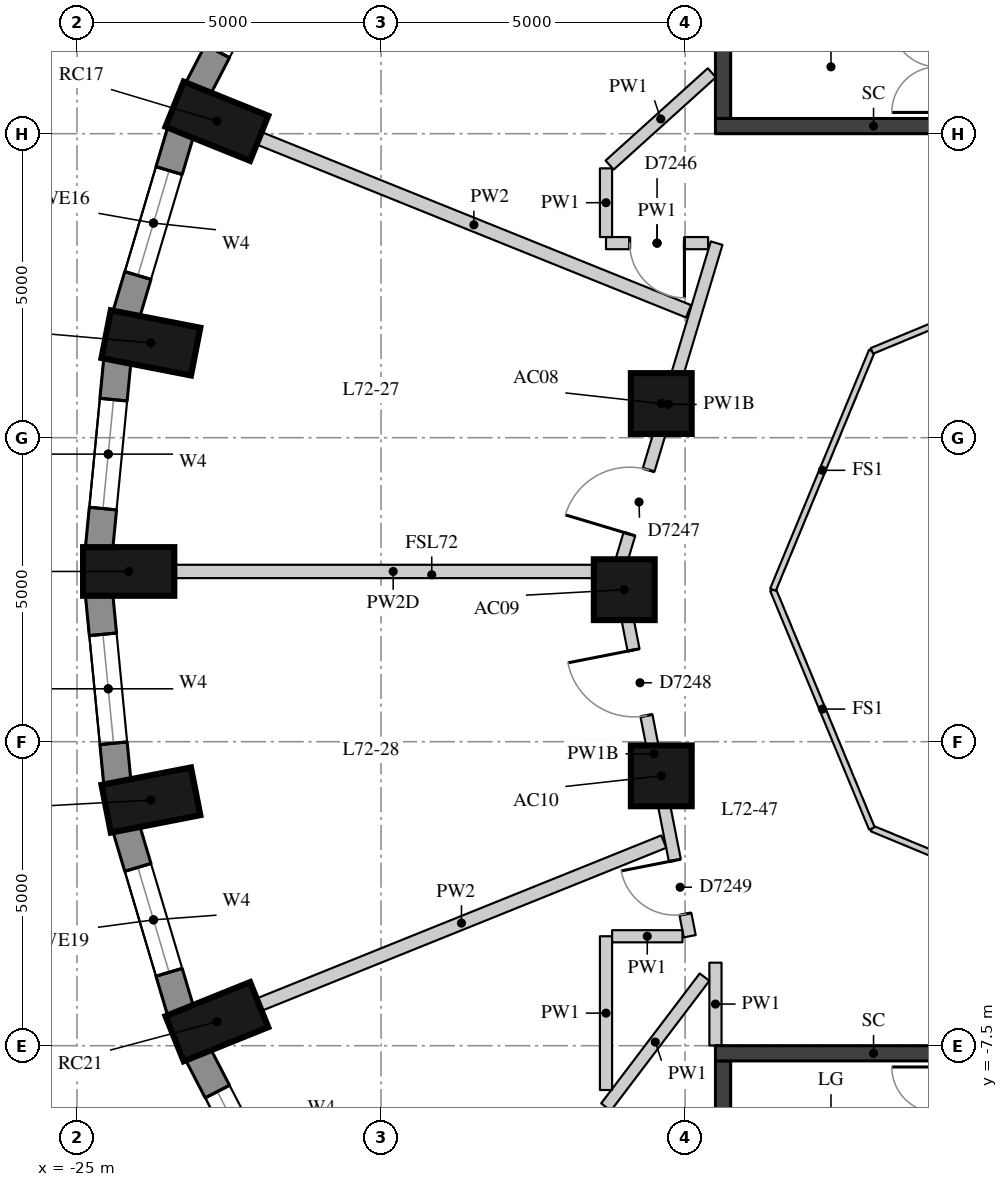
"""IFC4 building model, lengths in metres.
Left out: names, types, materials, properties, quantities, classifications, styles, units other than length and angle.
Written with IfcOpenShell. Run it as: python <this file> out.ifc"""

import sys

from ifc_helpers import new_model, si_unit, direction, frame, frame_2d, origin, origin_2d, place, context, subcontext, project, spatial, rectangle, extrude, element, fill, save


model = new_model("IFC4")
c1 = context("Model", 3, precision=1e-05, world=origin(), true_north=direction((0.0, 1.0)))
c2 = subcontext(c1, "Body", "Model", "MODEL_VIEW")
j1 = project(units=[si_unit("LENGTHUNIT", "METRE"), si_unit("PLANEANGLEUNIT", "RADIAN")], contexts=[c1])
p1 = place(None, origin())
s1 = spatial("IfcSite", under=j1, at=p1, CompositionType="ELEMENT")
p2 = place(p1, origin())
s2 = spatial("IfcBuilding", under=s1, at=p2, CompositionType="ELEMENT")
p3 = place(p2, frame((0.0, 0.0, 253.1)))
s3 = spatial("IfcBuildingStorey", under=s2, at=p3, CompositionType="ELEMENT", Elevation=253.1)
for number, where, z_axis, x_axis in (
    (1, (-22.7, 7.705, 0.0), (0.0, 0.0, 1.0), (-0.928, 0.374, 0.0)),
    (2, (-23.785, 4.06, 0.0), (0.0, 0.0, 1.0), (-0.981, 0.192, 0.0)),
    (3, (-24.15, 0.3, 0.0), (0.0, 0.0, 1.0), (-1.0, 0.0, 0.0)),
    (4, (-23.785, -3.459, 0.0), (0.0, 0.0, 1.0), (-0.981, -0.192, 0.0)),
    (5, (-22.7, -7.105, 0.0), (0.0, 0.0, 1.0), (-0.928, -0.374, 0.0)),
):
    element("IfcColumn", number, at=place(p3, frame(where, z_axis=z_axis, x_axis=x_axis)), inside=s3, PredefinedType="COLUMN", context=c2, shape_type="SweptSolid", body=[
        extrude(rectangle(XDim=1.5, YDim=0.8, at=origin_2d()), origin(), (0.0, 0.0, 1.0), 3.3),
    ])
for number, where, z_axis, x_axis in (
    (6, (-15.391, 3.062, 0.0), (0.0, 0.0, 1.0), (1.0, 0.0, 0.0)),
    (7, (-16.0, 0.0, 0.0), (0.0, 0.0, 1.0), (1.0, 0.0, 0.0)),
    (8, (-15.391, -3.062, 0.0), (0.0, 0.0, 1.0), (1.0, 0.0, 0.0)),
):
    element("IfcColumn", number, at=place(p3, frame(where, z_axis=z_axis, x_axis=x_axis)), inside=s3, PredefinedType="COLUMN", context=c2, shape_type="SweptSolid", body=[
        extrude(rectangle(XDim=1.0, YDim=1.0, at=origin_2d()), origin(), (0.0, 0.0, 1.0), 3.3),
    ])
p4 = place(p3, frame((-21.545, 11.068, 0.0), z_axis=(0.0, 0.0, 1.0), x_axis=(-0.459889857669, -0.887975967475, 0.0)))
e9 = element("IfcWall", 9, at=p4, inside=s3, PredefinedType="SOLIDWALL", context=c2, shape_type="SweptSolid", body=[
    extrude(rectangle(XDim=3.186, YDim=0.45, at=frame_2d((1.593, 0.0))), origin(), (0.0, 0.0, 1.0), 3.02),
])
p5 = place(p4, frame((0.693, 0.0, 0.4)))
e10 = element("IfcOpeningElement", 10, at=p5, cuts=e9, PredefinedType="OPENING", context=c2, shape_type="SweptSolid", body=[
    extrude(rectangle(XDim=1.8, YDim=1.75, at=frame_2d((0.9, 0.875))), frame((0.0, 0.235, 0.0), z_axis=(0.0, -1.0, 0.0), x_axis=(1.0, 0.0, 0.0)), (0.0, 0.0, 1.0), 0.47),
])
p6 = place(p3, frame((-23.294, 7.535, 0.0), z_axis=(0.0, 0.0, 1.0), x_axis=(-0.285263800865, -0.958449040855, 0.0)))
e11 = element("IfcWall", 11, at=p6, inside=s3, PredefinedType="SOLIDWALL", context=c2, shape_type="SweptSolid", body=[
    extrude(rectangle(XDim=3.139, YDim=0.45, at=frame_2d((1.57, 0.0))), origin(), (0.0, 0.0, 1.0), 3.02),
])
p7 = place(p6, frame((0.67, 0.0, 0.4)))
e12 = element("IfcOpeningElement", 12, at=p7, cuts=e11, PredefinedType="OPENING", context=c2, shape_type="SweptSolid", body=[
    extrude(rectangle(XDim=1.8, YDim=1.75, at=frame_2d((0.9, 0.875))), frame((0.0, 0.235, 0.0), z_axis=(0.0, -1.0, 0.0), x_axis=(1.0, 0.0, 0.0)), (0.0, 0.0, 1.0), 0.47),
])
p8 = place(p3, frame((-24.336, 3.78, 0.0), z_axis=(0.0, 0.0, 1.0), x_axis=(-0.096740086873, -0.995309678237, 0.0)))
e13 = element("IfcWall", 13, at=p8, inside=s3, PredefinedType="SOLIDWALL", context=c2, shape_type="SweptSolid", body=[
    extrude(rectangle(XDim=3.114, YDim=0.45, at=frame_2d((1.557, 0.0))), origin(), (0.0, 0.0, 1.0), 3.02),
])
p9 = place(p8, frame((0.657, 0.0, 0.4)))
e14 = element("IfcOpeningElement", 14, at=p9, cuts=e13, PredefinedType="OPENING", context=c2, shape_type="SweptSolid", body=[
    extrude(rectangle(XDim=1.8, YDim=1.75, at=frame_2d((0.9, 0.875))), frame((0.0, 0.235, 0.0), z_axis=(0.0, -1.0, 0.0), x_axis=(1.0, 0.0, 0.0)), (0.0, 0.0, 1.0), 0.47),
])
p10 = place(p3, frame((-24.637, -0.08, 0.0), z_axis=(0.0, 0.0, 1.0), x_axis=(0.09673253904, -0.995310411827, 0.0)))
e15 = element("IfcWall", 15, at=p10, inside=s3, PredefinedType="SOLIDWALL", context=c2, shape_type="SweptSolid", body=[
    extrude(rectangle(XDim=3.115, YDim=0.45, at=frame_2d((1.557, 0.0))), origin(), (0.0, 0.0, 1.0), 3.02),
])
p11 = place(p10, frame((0.657, 0.0, 0.4)))
e16 = element("IfcOpeningElement", 16, at=p11, cuts=e15, PredefinedType="OPENING", context=c2, shape_type="SweptSolid", body=[
    extrude(rectangle(XDim=1.8, YDim=1.75, at=frame_2d((0.9, 0.875))), frame((0.0, 0.235, 0.0), z_axis=(0.0, -1.0, 0.0), x_axis=(1.0, 0.0, 0.0)), (0.0, 0.0, 1.0), 0.47),
])
p12 = place(p3, frame((-24.19, -3.926, 0.0), z_axis=(0.0, 0.0, 1.0), x_axis=(0.285263800865, -0.958449040855, 0.0)))
e17 = element("IfcWall", 17, at=p12, inside=s3, PredefinedType="SOLIDWALL", context=c2, shape_type="SweptSolid", body=[
    extrude(rectangle(XDim=3.139, YDim=0.45, at=frame_2d((1.57, 0.0))), origin(), (0.0, 0.0, 1.0), 3.02),
])
p13 = place(p12, frame((0.67, 0.0, 0.4)))
e18 = element("IfcOpeningElement", 18, at=p13, cuts=e17, PredefinedType="OPENING", context=c2, shape_type="SweptSolid", body=[
    extrude(rectangle(XDim=1.8, YDim=1.75, at=frame_2d((0.9, 0.875))), frame((0.0, 0.235, 0.0), z_axis=(0.0, -1.0, 0.0), x_axis=(1.0, 0.0, 0.0)), (0.0, 0.0, 1.0), 0.47),
])
p14 = place(p3, frame((-23.01, -7.64, 0.0), z_axis=(0.0, 0.0, 1.0), x_axis=(0.459921155255, -0.887959757505, 0.0)))
e19 = element("IfcWall", 19, at=p14, inside=s3, PredefinedType="SOLIDWALL", context=c2, shape_type="SweptSolid", body=[
    extrude(rectangle(XDim=3.186, YDim=0.45, at=frame_2d((1.593, 0.0))), origin(), (0.0, 0.0, 1.0), 3.02),
])
p15 = place(p14, frame((0.693, 0.0, 0.4)))
e20 = element("IfcOpeningElement", 20, at=p15, cuts=e19, PredefinedType="OPENING", context=c2, shape_type="SweptSolid", body=[
    extrude(rectangle(XDim=1.8, YDim=1.75, at=frame_2d((0.9, 0.875))), frame((0.0, 0.235, 0.0), z_axis=(0.0, -1.0, 0.0), x_axis=(1.0, 0.0, 0.0)), (0.0, 0.0, 1.0), 0.47),
])
p16 = place(p3, frame((-14.375, 7.75, -0.28), z_axis=(0.0, 0.0, 1.0), x_axis=(0.0, 1.0, 0.0)))
e21 = element("IfcWall", 21, at=p16, inside=s3, PredefinedType="SHEAR", context=c2, shape_type="SweptSolid", body=[
    extrude(rectangle(XDim=6.0, YDim=0.25, at=frame_2d((3.0, 0.0))), origin(), (0.0, 0.0, 1.0), 3.3),
])
p17 = place(p3, frame((-14.5, 7.625, -0.28), z_axis=(0.0, 0.0, 1.0), x_axis=(1.0, 0.0, 0.0)))
e22 = element("IfcWall", 22, at=p17, inside=s3, PredefinedType="SHEAR", context=c2, shape_type="SweptSolid", body=[
    extrude(rectangle(XDim=5.2, YDim=0.25, at=frame_2d((2.6, 0.0))), origin(), (0.0, 0.0, 1.0), 3.3),
])
p18 = place(p3, frame((-14.375, -13.75, -0.28), z_axis=(0.0, 0.0, 1.0), x_axis=(0.0, 1.0, 0.0)))
e23 = element("IfcWall", 23, at=p18, inside=s3, PredefinedType="SHEAR", context=c2, shape_type="SweptSolid", body=[
    extrude(rectangle(XDim=6.0, YDim=0.25, at=frame_2d((3.0, 0.0))), origin(), (0.0, 0.0, 1.0), 3.3),
])
p19 = place(p3, frame((-14.5, -7.625, -0.28), z_axis=(0.0, 0.0, 1.0), x_axis=(1.0, 0.0, 0.0)))
e24 = element("IfcWall", 24, at=p19, inside=s3, PredefinedType="SHEAR", context=c2, shape_type="SweptSolid", body=[
    extrude(rectangle(XDim=5.2, YDim=0.25, at=frame_2d((2.6, 0.0))), origin(), (0.0, 0.0, 1.0), 3.3),
])
p20 = place(p3, frame((-14.923, -5.7, 0.0), z_axis=(0.0, 0.0, 1.0), x_axis=(-0.192536596074, 0.981289793676, 0.0)))
e25 = element("IfcWall", 25, at=p20, inside=s3, PredefinedType="PARTITIONING", context=c2, shape_type="SweptSolid", body=[
    extrude(rectangle(XDim=6.115, YDim=0.2, at=frame_2d((3.057, 0.0))), origin(), (0.0, 0.0, 1.0), 2.52),
])
p21 = place(p20, frame((3.699, 0.0, 0.0)))
e26 = element("IfcOpeningElement", 26, at=p21, cuts=e25, PredefinedType="OPENING", context=c2, shape_type="SweptSolid", body=[
    extrude(rectangle(XDim=1.1, YDim=2.1, at=frame_2d((0.55, 1.05))), frame((0.0, 0.11, 0.0), z_axis=(0.0, -1.0, 0.0), x_axis=(1.0, 0.0, 0.0)), (0.0, 0.0, 1.0), 0.22),
])
p22 = place(p20, frame((0.372, 0.0, 0.0)))
e27 = element("IfcOpeningElement", 27, at=p22, cuts=e25, PredefinedType="OPENING", context=c2, shape_type="SweptSolid", body=[
    extrude(rectangle(XDim=0.9, YDim=2.1, at=frame_2d((0.45, 1.05))), frame((0.0, 0.11, 0.0), z_axis=(0.0, -1.0, 0.0), x_axis=(1.0, 0.0, 0.0)), (0.0, 0.0, 1.0), 0.22),
])
p23 = place(p3, frame((-16.071, 0.395, 0.0), z_axis=(0.0, 0.0, 1.0), x_axis=(0.287129472402, 0.957891782029, 0.0)))
e28 = element("IfcWall", 28, at=p23, inside=s3, PredefinedType="PARTITIONING", context=c2, shape_type="SweptSolid", body=[
    extrude(rectangle(XDim=5.538, YDim=0.2, at=frame_2d((2.769, 0.0))), origin(), (0.0, 0.0, 1.0), 2.52),
])
p24 = place(p23, frame((0.543, 0.0, 0.0)))
e29 = element("IfcOpeningElement", 29, at=p24, cuts=e28, PredefinedType="OPENING", context=c2, shape_type="SweptSolid", body=[
    extrude(rectangle(XDim=1.1, YDim=2.1, at=frame_2d((0.55, 1.05))), frame((0.0, 0.11, 0.0), z_axis=(0.0, -1.0, 0.0), x_axis=(1.0, 0.0, 0.0)), (0.0, 0.0, 1.0), 0.22),
])
p25 = place(p3, frame((-14.621, 5.7, 0.0), z_axis=(0.0, 0.0, 1.0), x_axis=(-1.0, 0.0, 0.0)))
e30 = element("IfcWall", 30, at=p25, inside=s3, PredefinedType="PARTITIONING", context=c2, shape_type="SweptSolid", body=[
    extrude(rectangle(XDim=1.679, YDim=0.2, at=frame_2d((0.84, 0.0))), origin(), (0.0, 0.0, 1.0), 3.02),
])
p26 = place(p25, frame((0.39, 0.0, 0.0)))
e31 = element("IfcOpeningElement", 31, at=p26, cuts=e30, PredefinedType="OPENING", context=c2, shape_type="SweptSolid", body=[
    extrude(rectangle(XDim=0.9, YDim=2.1, at=frame_2d((0.45, 1.05))), frame((0.0, 0.11, 0.0), z_axis=(0.0, -1.0, 0.0), x_axis=(1.0, 0.0, 0.0)), (0.0, 0.0, 1.0), 0.22),
])
p27 = place(p3, frame((-16.3, 5.8, 0.0), z_axis=(0.0, 0.0, 1.0), x_axis=(0.0, 1.0, 0.0)))
e32 = element("IfcWall", 32, at=p27, inside=s3, PredefinedType="PARTITIONING", context=c2, shape_type="SweptSolid", body=[
    extrude(rectangle(XDim=1.13, YDim=0.2, at=frame_2d((0.565, 0.0))), origin(), (0.0, 0.0, 1.0), 3.02),
])
p28 = place(p3, frame((-16.24, 6.984, 0.0), z_axis=(0.0, 0.0, 1.0), x_axis=(0.742140692687, 0.67024412885, 0.0)))
e33 = element("IfcWall", 33, at=p28, inside=s3, PredefinedType="PARTITIONING", context=c2, shape_type="SweptSolid", body=[
    extrude(rectangle(XDim=2.265, YDim=0.2, at=frame_2d((1.132, 0.0))), origin(), (0.0, 0.0, 1.0), 3.02),
])
p29 = place(p3, frame((-14.5, -7.496, 0.0), z_axis=(0.0, 0.0, 1.0), x_axis=(0.0, 1.0, 0.0)))
e34 = element("IfcWall", 34, at=p29, inside=s3, PredefinedType="PARTITIONING", context=c2, shape_type="SweptSolid", body=[
    extrude(rectangle(XDim=1.362, YDim=0.2, at=frame_2d((0.681, 0.0))), origin(), (0.0, 0.0, 1.0), 3.02),
])
p30 = place(p3, frame((-14.679, -6.372, 0.0), z_axis=(0.0, 0.0, 1.0), x_axis=(-0.604258962547, -0.796787993247, 0.0)))
e35 = element("IfcWall", 35, at=p30, inside=s3, PredefinedType="PARTITIONING", context=c2, shape_type="SweptSolid", body=[
    extrude(rectangle(XDim=2.682, YDim=0.2, at=frame_2d((1.341, 0.0))), origin(), (0.0, 0.0, 1.0), 3.02),
])
p31 = place(p3, frame((-16.3, -8.229, 0.0), z_axis=(0.0, 0.0, 1.0), x_axis=(0.0, 1.0, 0.0)))
e36 = element("IfcWall", 36, at=p31, inside=s3, PredefinedType="PARTITIONING", context=c2, shape_type="SweptSolid", body=[
    extrude(rectangle(XDim=2.529, YDim=0.2, at=frame_2d((1.265, 0.0))), origin(), (0.0, 0.0, 1.0), 3.02),
])
p32 = place(p3, frame((-16.2, -5.7, 0.0), z_axis=(0.0, 0.0, 1.0), x_axis=(1.0, 0.0, 0.0)))
e37 = element("IfcWall", 37, at=p32, inside=s3, PredefinedType="PARTITIONING", context=c2, shape_type="SweptSolid", body=[
    extrude(rectangle(XDim=1.157, YDim=0.2, at=frame_2d((0.579, 0.0))), origin(), (0.0, 0.0, 1.0), 3.02),
])
p33 = place(p3, frame((-22.004, 7.424, 0.0), z_axis=(0.0, 0.0, 1.0), x_axis=(0.927533826991, -0.373739213607, 0.0)))
e38 = element("IfcWall", 38, at=p33, inside=s3, PredefinedType="PARTITIONING", context=c2, shape_type="SweptSolid", body=[
    extrude(rectangle(XDim=7.614, YDim=0.22, at=frame_2d((3.807, 0.0))), origin(), (0.0, 0.0, 1.0), 3.02),
])
p34 = place(p3, frame((-23.4, 0.3, 0.0), z_axis=(0.0, 0.0, 1.0), x_axis=(1.0, 0.0, 0.0)))
e39 = element("IfcWall", 39, at=p34, inside=s3, PredefinedType="PARTITIONING", context=c2, shape_type="SweptSolid", body=[
    extrude(rectangle(XDim=7.2, YDim=0.22, at=frame_2d((3.6, 0.0))), origin(), (0.0, 0.0, 1.0), 2.47),
])
p35 = place(p3, frame((-22.004, -6.824, 0.0), z_axis=(0.0, 0.0, 1.0), x_axis=(0.927530164265, 0.373748303513, 0.0)))
e40 = element("IfcWall", 40, at=p35, inside=s3, PredefinedType="PARTITIONING", context=c2, shape_type="SweptSolid", body=[
    extrude(rectangle(XDim=7.174, YDim=0.22, at=frame_2d((3.587, 0.0))), origin(), (0.0, 0.0, 1.0), 3.02),
])
for number, where, z_axis, x_axis in (
    (41, (-8.0, -5.554, 0.0), (0.0, 0.0, 1.0), (-0.924, 0.383, 0.0)),
    (42, (-11.927, -3.927, 0.0), (0.0, 0.0, 1.0), (-0.383, 0.924, 0.0)),
    (43, (-13.554, 0.0, 0.0), (0.0, 0.0, 1.0), (0.383, 0.924, 0.0)),
    (44, (-11.927, 3.927, 0.0), (0.0, 0.0, 1.0), (0.924, 0.383, 0.0)),
):
    element("IfcWall", number, at=place(p3, frame(where, z_axis=z_axis, x_axis=x_axis)), inside=s3, PredefinedType="PARTITIONING", context=c2, shape_type="SweptSolid", body=[
        extrude(rectangle(XDim=4.251, YDim=0.1, at=frame_2d((2.125, 0.0))), origin(), (0.0, 0.0, 1.0), 3.02),
    ])
p36 = place(p5, origin())
e45 = element("IfcWindow", 45, at=p36, inside=s3, PartitioningType="SINGLE_PANEL", PredefinedType="WINDOW", context=c2, shape_type="SweptSolid", body=[
    extrude(rectangle(XDim=1.8, YDim=1.75, at=frame_2d((0.9, 0.875))), frame((0.0, 0.035, 0.0), z_axis=(0.0, -1.0, 0.0), x_axis=(1.0, 0.0, 0.0)), (0.0, 0.0, 1.0), 0.06),
])
fill(e10, e45)
p37 = place(p7, origin())
e46 = element("IfcWindow", 46, at=p37, inside=s3, PartitioningType="SINGLE_PANEL", PredefinedType="WINDOW", context=c2, shape_type="SweptSolid", body=[
    extrude(rectangle(XDim=1.8, YDim=1.75, at=frame_2d((0.9, 0.875))), frame((0.0, 0.035, 0.0), z_axis=(0.0, -1.0, 0.0), x_axis=(1.0, 0.0, 0.0)), (0.0, 0.0, 1.0), 0.06),
])
fill(e12, e46)
p38 = place(p9, origin())
e47 = element("IfcWindow", 47, at=p38, inside=s3, PartitioningType="SINGLE_PANEL", PredefinedType="WINDOW", context=c2, shape_type="SweptSolid", body=[
    extrude(rectangle(XDim=1.8, YDim=1.75, at=frame_2d((0.9, 0.875))), frame((0.0, 0.035, 0.0), z_axis=(0.0, -1.0, 0.0), x_axis=(1.0, 0.0, 0.0)), (0.0, 0.0, 1.0), 0.06),
])
fill(e14, e47)
p39 = place(p11, origin())
e48 = element("IfcWindow", 48, at=p39, inside=s3, PartitioningType="SINGLE_PANEL", PredefinedType="WINDOW", context=c2, shape_type="SweptSolid", body=[
    extrude(rectangle(XDim=1.8, YDim=1.75, at=frame_2d((0.9, 0.875))), frame((0.0, 0.035, 0.0), z_axis=(0.0, -1.0, 0.0), x_axis=(1.0, 0.0, 0.0)), (0.0, 0.0, 1.0), 0.06),
])
fill(e16, e48)
p40 = place(p13, origin())
e49 = element("IfcWindow", 49, at=p40, inside=s3, PartitioningType="SINGLE_PANEL", PredefinedType="WINDOW", context=c2, shape_type="SweptSolid", body=[
    extrude(rectangle(XDim=1.8, YDim=1.75, at=frame_2d((0.9, 0.875))), frame((0.0, 0.035, 0.0), z_axis=(0.0, -1.0, 0.0), x_axis=(1.0, 0.0, 0.0)), (0.0, 0.0, 1.0), 0.06),
])
fill(e18, e49)
p41 = place(p15, origin())
e50 = element("IfcWindow", 50, at=p41, inside=s3, PartitioningType="SINGLE_PANEL", PredefinedType="WINDOW", context=c2, shape_type="SweptSolid", body=[
    extrude(rectangle(XDim=1.8, YDim=1.75, at=frame_2d((0.9, 0.875))), frame((0.0, 0.035, 0.0), z_axis=(0.0, -1.0, 0.0), x_axis=(1.0, 0.0, 0.0)), (0.0, 0.0, 1.0), 0.06),
])
fill(e20, e50)
p42 = place(p26, origin())
e51 = element("IfcDoor", 51, at=p42, inside=s3, OperationType="SINGLE_SWING_LEFT", PredefinedType="DOOR", context=c2, shape_type="SweptSolid", body=[
    extrude(rectangle(XDim=0.9, YDim=2.1, at=frame_2d((0.45, 1.05))), frame((0.0, 0.025, 0.0), z_axis=(0.0, -1.0, 0.0), x_axis=(1.0, 0.0, 0.0)), (0.0, 0.0, 1.0), 0.05),
])
fill(e31, e51)
p43 = place(p24, origin())
e52 = element("IfcDoor", 52, at=p43, inside=s3, OperationType="SINGLE_SWING_LEFT", PredefinedType="DOOR", context=c2, shape_type="SweptSolid", body=[
    extrude(rectangle(XDim=1.1, YDim=2.1, at=frame_2d((0.55, 1.05))), frame((0.0, 0.025, 0.0), z_axis=(0.0, -1.0, 0.0), x_axis=(1.0, 0.0, 0.0)), (0.0, 0.0, 1.0), 0.05),
])
fill(e29, e52)
p44 = place(p21, origin())
e53 = element("IfcDoor", 53, at=p44, inside=s3, OperationType="SINGLE_SWING_RIGHT", PredefinedType="DOOR", context=c2, shape_type="SweptSolid", body=[
    extrude(rectangle(XDim=1.1, YDim=2.1, at=frame_2d((0.55, 1.05))), frame((0.0, 0.025, 0.0), z_axis=(0.0, -1.0, 0.0), x_axis=(1.0, 0.0, 0.0)), (0.0, 0.0, 1.0), 0.05),
])
fill(e26, e53)
p45 = place(p22, origin())
e54 = element("IfcDoor", 54, at=p45, inside=s3, OperationType="SINGLE_SWING_RIGHT", PredefinedType="DOOR", context=c2, shape_type="SweptSolid", body=[
    extrude(rectangle(XDim=0.9, YDim=2.1, at=frame_2d((0.45, 1.05))), frame((0.0, 0.025, 0.0), z_axis=(0.0, -1.0, 0.0), x_axis=(1.0, 0.0, 0.0)), (0.0, 0.0, 1.0), 0.05),
])
fill(e27, e54)
save(model, sys.argv[1])
